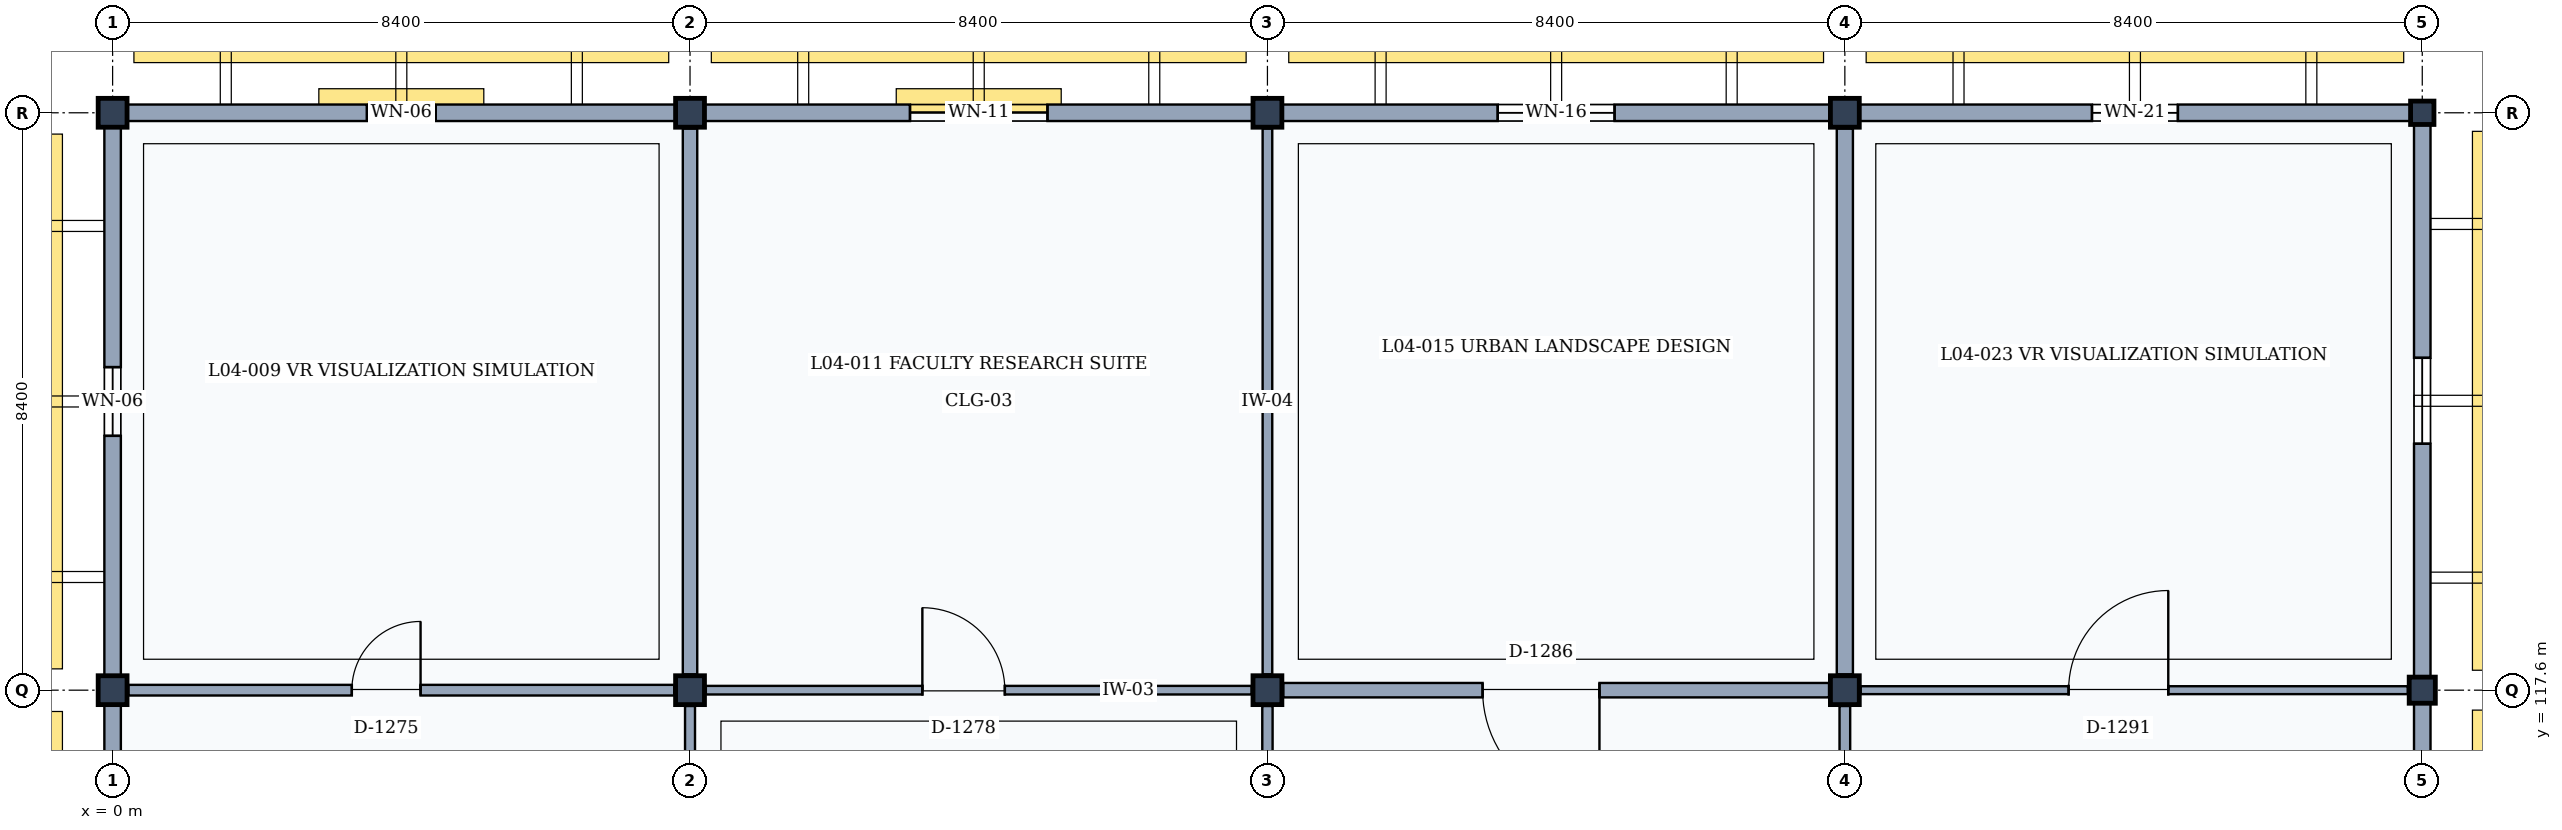
"""IFC4 building model, lengths in metres.
Left out: names, types, materials, properties, quantities, classifications, styles, units other than length and angle.
Written with IfcOpenShell. Run it as: python <this file> out.ifc"""

import sys

from ifc_helpers import new_model, si_unit, direction, frame, frame_2d, origin, origin_2d, place, context, subcontext, project, spatial, rectangle, extrude, element, fill, save


model = new_model("IFC4")
c1 = context("Model", 3, precision=1e-05, world=origin(), true_north=direction((0.0, 1.0)))
c2 = subcontext(c1, "Body", "Model", "MODEL_VIEW")
j1 = project(units=[si_unit("LENGTHUNIT", "METRE"), si_unit("PLANEANGLEUNIT", "RADIAN")], contexts=[c1])
p1 = place(None, origin())
s1 = spatial("IfcSite", under=j1, at=p1, CompositionType="ELEMENT")
p2 = place(p1, origin())
s2 = spatial("IfcBuilding", under=s1, at=p2, CompositionType="ELEMENT")
p3 = place(p2, frame((0.0, 0.0, 18.0)))
s3 = spatial("IfcBuildingStorey", under=s2, at=p3, CompositionType="ELEMENT", Elevation=18.0)
for number, where, z_axis, x_axis in (
    (1, (0.0, 117.6, 0.0), (0.0, 0.0, 1.0), (1.0, 0.0, 0.0)),
    (2, (0.0, 126.0, 0.0), (0.0, 0.0, 1.0), (1.0, 0.0, 0.0)),
    (3, (8.4, 117.6, 0.0), (0.0, 0.0, 1.0), (1.0, 0.0, 0.0)),
    (4, (8.4, 126.0, 0.0), (0.0, 0.0, 1.0), (1.0, 0.0, 0.0)),
    (5, (16.8, 117.6, 0.0), (0.0, 0.0, 1.0), (1.0, 0.0, 0.0)),
    (6, (16.8, 126.0, 0.0), (0.0, 0.0, 1.0), (1.0, 0.0, 0.0)),
    (7, (25.2, 117.6, 0.0), (0.0, 0.0, 1.0), (1.0, 0.0, 0.0)),
    (8, (25.2, 126.0, 0.0), (0.0, 0.0, 1.0), (1.0, 0.0, 0.0)),
):
    element("IfcColumn", number, at=place(p3, frame(where, z_axis=z_axis, x_axis=x_axis)), inside=s3, PredefinedType="COLUMN", context=c2, shape_type="SweptSolid", body=[
        extrude(rectangle(XDim=0.42, YDim=0.42, at=origin_2d()), origin(), (0.0, 0.0, 1.0), 4.2),
    ])
p4 = place(p3, frame((33.6, 117.6, 0.0), z_axis=(0.0, 0.0, 1.0), x_axis=(1.0, 0.0, 0.0)))
e9 = element("IfcColumn", 9, at=p4, inside=s3, PredefinedType="COLUMN", context=c2, shape_type="SweptSolid", body=[
    extrude(rectangle(XDim=0.38, YDim=0.38, at=origin_2d()), origin(), (0.0, 0.0, 1.0), 4.2),
])
p5 = place(p3, frame((33.6, 126.0, 0.0), z_axis=(0.0, 0.0, 1.0), x_axis=(1.0, 0.0, 0.0)))
e10 = element("IfcColumn", 10, at=p5, inside=s3, PredefinedType="COLUMN", context=c2, shape_type="SweptSolid", body=[
    extrude(rectangle(XDim=0.34, YDim=0.34, at=origin_2d()), origin(), (0.0, 0.0, 1.0), 4.2),
])
p6 = place(p3, frame((0.0, 109.41, 0.0), z_axis=(0.0, 0.0, 1.0), x_axis=(0.0, 1.0, 0.0)))
e11 = element("IfcWall", 11, at=p6, inside=s3, PredefinedType="SOLIDWALL", context=c2, shape_type="SweptSolid", body=[
    extrude(rectangle(XDim=7.98, YDim=0.24, at=frame_2d((3.99, 0.0))), origin(), (0.0, 0.0, 1.0), 3.36),
])
p7 = place(p6, frame((2.69, 0.0, 0.9)))
e12 = element("IfcOpeningElement", 12, at=p7, cuts=e11, PredefinedType="OPENING", context=c2, shape_type="SweptSolid", body=[
    extrude(rectangle(XDim=2.6, YDim=2.1, at=frame_2d((1.3, 1.05))), frame((0.0, 0.13, 0.0), z_axis=(0.0, -1.0, 0.0), x_axis=(1.0, 0.0, 0.0)), (0.0, 0.0, 1.0), 0.26),
])
p8 = place(p3, frame((0.21, 126.0, 0.0), z_axis=(0.0, 0.0, 1.0), x_axis=(1.0, 0.0, 0.0)))
e13 = element("IfcWall", 13, at=p8, inside=s3, PredefinedType="SOLIDWALL", context=c2, shape_type="SweptSolid", body=[
    extrude(rectangle(XDim=7.98, YDim=0.24, at=frame_2d((3.99, 0.0))), origin(), (0.0, 0.0, 1.0), 3.36),
])
p9 = place(p8, frame((3.49, 0.0, 0.9)))
e14 = element("IfcOpeningElement", 14, at=p9, cuts=e13, PredefinedType="OPENING", context=c2, shape_type="SweptSolid", body=[
    extrude(rectangle(XDim=1.0, YDim=1.4, at=frame_2d((0.5, 0.7))), frame((0.0, 0.13, 0.0), z_axis=(0.0, -1.0, 0.0), x_axis=(1.0, 0.0, 0.0)), (0.0, 0.0, 1.0), 0.26),
])
p10 = place(p3, frame((0.0, 117.81, 0.0), z_axis=(0.0, 0.0, 1.0), x_axis=(0.0, 1.0, 0.0)))
e15 = element("IfcWall", 15, at=p10, inside=s3, PredefinedType="SOLIDWALL", context=c2, shape_type="SweptSolid", body=[
    extrude(rectangle(XDim=7.98, YDim=0.24, at=frame_2d((3.99, 0.0))), origin(), (0.0, 0.0, 1.0), 3.36),
])
p11 = place(p10, frame((3.49, 0.0, 0.9)))
e16 = element("IfcOpeningElement", 16, at=p11, cuts=e15, PredefinedType="OPENING", context=c2, shape_type="SweptSolid", body=[
    extrude(rectangle(XDim=1.0, YDim=1.4, at=frame_2d((0.5, 0.7))), frame((0.0, 0.13, 0.0), z_axis=(0.0, -1.0, 0.0), x_axis=(1.0, 0.0, 0.0)), (0.0, 0.0, 1.0), 0.26),
])
p12 = place(p3, frame((8.61, 126.0, 0.0), z_axis=(0.0, 0.0, 1.0), x_axis=(1.0, 0.0, 0.0)))
e17 = element("IfcWall", 17, at=p12, inside=s3, PredefinedType="SOLIDWALL", context=c2, shape_type="SweptSolid", body=[
    extrude(rectangle(XDim=7.98, YDim=0.24, at=frame_2d((3.99, 0.0))), origin(), (0.0, 0.0, 1.0), 3.36),
])
p13 = place(p12, frame((2.99, 0.0, 0.9)))
e18 = element("IfcOpeningElement", 18, at=p13, cuts=e17, PredefinedType="OPENING", context=c2, shape_type="SweptSolid", body=[
    extrude(rectangle(XDim=2.0, YDim=1.7, at=frame_2d((1.0, 0.85))), frame((0.0, 0.13, 0.0), z_axis=(0.0, -1.0, 0.0), x_axis=(1.0, 0.0, 0.0)), (0.0, 0.0, 1.0), 0.26),
])
p14 = place(p3, frame((17.01, 126.0, 0.0), z_axis=(0.0, 0.0, 1.0), x_axis=(1.0, 0.0, 0.0)))
e19 = element("IfcWall", 19, at=p14, inside=s3, PredefinedType="SOLIDWALL", context=c2, shape_type="SweptSolid", body=[
    extrude(rectangle(XDim=7.98, YDim=0.24, at=frame_2d((3.99, 0.0))), origin(), (0.0, 0.0, 1.0), 3.36),
])
p15 = place(p14, frame((3.14, 0.0, 0.9)))
e20 = element("IfcOpeningElement", 20, at=p15, cuts=e19, PredefinedType="OPENING", context=c2, shape_type="SweptSolid", body=[
    extrude(rectangle(XDim=1.7, YDim=1.55, at=frame_2d((0.85, 0.775))), frame((0.0, 0.13, 0.0), z_axis=(0.0, -1.0, 0.0), x_axis=(1.0, 0.0, 0.0)), (0.0, 0.0, 1.0), 0.26),
])
p16 = place(p3, frame((33.6, 117.41, 0.0), z_axis=(0.0, 0.0, 1.0), x_axis=(0.0, -1.0, 0.0)))
e21 = element("IfcWall", 21, at=p16, inside=s3, PredefinedType="SOLIDWALL", context=c2, shape_type="SweptSolid", body=[
    extrude(rectangle(XDim=8.02, YDim=0.24, at=frame_2d((4.01, 0.0))), origin(), (0.0, 0.0, 1.0), 3.36),
])
p17 = place(p16, frame((3.06, 0.0, 0.9)))
e22 = element("IfcOpeningElement", 22, at=p17, cuts=e21, PredefinedType="OPENING", context=c2, shape_type="SweptSolid", body=[
    extrude(rectangle(XDim=1.9, YDim=2.05, at=frame_2d((0.95, 1.025))), frame((0.0, 0.13, 0.0), z_axis=(0.0, -1.0, 0.0), x_axis=(1.0, 0.0, 0.0)), (0.0, 0.0, 1.0), 0.26),
])
p18 = place(p3, frame((25.41, 126.0, 0.0), z_axis=(0.0, 0.0, 1.0), x_axis=(1.0, 0.0, 0.0)))
e23 = element("IfcWall", 23, at=p18, inside=s3, PredefinedType="SOLIDWALL", context=c2, shape_type="SweptSolid", body=[
    extrude(rectangle(XDim=8.02, YDim=0.24, at=frame_2d((4.01, 0.0))), origin(), (0.0, 0.0, 1.0), 3.36),
])
p19 = place(p18, frame((3.385, 0.0, 0.9)))
e24 = element("IfcOpeningElement", 24, at=p19, cuts=e23, PredefinedType="OPENING", context=c2, shape_type="SweptSolid", body=[
    extrude(rectangle(XDim=1.25, YDim=1.7, at=frame_2d((0.625, 0.85))), frame((0.0, 0.13, 0.0), z_axis=(0.0, -1.0, 0.0), x_axis=(1.0, 0.0, 0.0)), (0.0, 0.0, 1.0), 0.26),
])
p20 = place(p3, frame((33.6, 125.83, 0.0), z_axis=(0.0, 0.0, 1.0), x_axis=(0.0, -1.0, 0.0)))
e25 = element("IfcWall", 25, at=p20, inside=s3, PredefinedType="SOLIDWALL", context=c2, shape_type="SweptSolid", body=[
    extrude(rectangle(XDim=8.04, YDim=0.24, at=frame_2d((4.02, 0.0))), origin(), (0.0, 0.0, 1.0), 3.36),
])
p21 = place(p20, frame((3.395, 0.0, 0.9)))
e26 = element("IfcOpeningElement", 26, at=p21, cuts=e25, PredefinedType="OPENING", context=c2, shape_type="SweptSolid", body=[
    extrude(rectangle(XDim=1.25, YDim=1.7, at=frame_2d((0.625, 0.85))), frame((0.0, 0.13, 0.0), z_axis=(0.0, -1.0, 0.0), x_axis=(1.0, 0.0, 0.0)), (0.0, 0.0, 1.0), 0.26),
])
p22 = place(p3, frame((8.4, 109.43, 0.0), z_axis=(0.0, 0.0, 1.0), x_axis=(0.0, 1.0, 0.0)))
e27 = element("IfcWall", 27, at=p22, inside=s3, PredefinedType="PARTITIONING", context=c2, shape_type="SweptSolid", body=[
    extrude(rectangle(XDim=7.94, YDim=0.145, at=frame_2d((3.97, 0.0))), origin(), (0.0, 0.0, 1.0), 3.32),
])
p23 = place(p3, frame((0.23, 117.6, 0.0), z_axis=(0.0, 0.0, 1.0), x_axis=(1.0, 0.0, 0.0)))
e28 = element("IfcWall", 28, at=p23, inside=s3, PredefinedType="PARTITIONING", context=c2, shape_type="SweptSolid", body=[
    extrude(rectangle(XDim=7.94, YDim=0.155, at=frame_2d((3.97, 0.0))), origin(), (0.0, 0.0, 1.0), 3.32),
])
p24 = place(p23, frame((3.25, 0.0, 0.0)))
e29 = element("IfcOpeningElement", 29, at=p24, cuts=e28, PredefinedType="OPENING", context=c2, shape_type="SweptSolid", body=[
    extrude(rectangle(XDim=1.0, YDim=2.15, at=frame_2d((0.5, 1.075))), frame((0.0, 0.087, 0.0), z_axis=(0.0, -1.0, 0.0), x_axis=(1.0, 0.0, 0.0)), (0.0, 0.0, 1.0), 0.175),
])
p25 = place(p3, frame((8.4, 117.83, 0.0), z_axis=(0.0, 0.0, 1.0), x_axis=(0.0, 1.0, 0.0)))
e30 = element("IfcWall", 30, at=p25, inside=s3, PredefinedType="PARTITIONING", context=c2, shape_type="SweptSolid", body=[
    extrude(rectangle(XDim=7.94, YDim=0.21, at=frame_2d((3.97, 0.0))), origin(), (0.0, 0.0, 1.0), 3.32),
])
p26 = place(p3, frame((16.8, 109.43, 0.0), z_axis=(0.0, 0.0, 1.0), x_axis=(0.0, 1.0, 0.0)))
e31 = element("IfcWall", 31, at=p26, inside=s3, PredefinedType="PARTITIONING", context=c2, shape_type="SweptSolid", body=[
    extrude(rectangle(XDim=7.94, YDim=0.15, at=frame_2d((3.97, 0.0))), origin(), (0.0, 0.0, 1.0), 3.32),
])
p27 = place(p26, frame((2.85, 0.0, 0.0)))
e32 = element("IfcOpeningElement", 32, at=p27, cuts=e31, PredefinedType="OPENING", context=c2, shape_type="SweptSolid", body=[
    extrude(rectangle(XDim=1.8, YDim=2.3, at=frame_2d((0.9, 1.15))), frame((0.0, 0.085, 0.0), z_axis=(0.0, -1.0, 0.0), x_axis=(1.0, 0.0, 0.0)), (0.0, 0.0, 1.0), 0.17),
])
p28 = place(p3, frame((8.63, 117.6, 0.0), z_axis=(0.0, 0.0, 1.0), x_axis=(1.0, 0.0, 0.0)))
e33 = element("IfcWall", 33, at=p28, inside=s3, PredefinedType="PARTITIONING", context=c2, shape_type="SweptSolid", body=[
    extrude(rectangle(XDim=7.94, YDim=0.125, at=frame_2d((3.97, 0.0))), origin(), (0.0, 0.0, 1.0), 3.32),
])
p29 = place(p28, frame((3.15, 0.0, 0.0)))
e34 = element("IfcOpeningElement", 34, at=p29, cuts=e33, PredefinedType="OPENING", context=c2, shape_type="SweptSolid", body=[
    extrude(rectangle(XDim=1.2, YDim=2.2, at=frame_2d((0.6, 1.1))), frame((0.0, 0.073, 0.0), z_axis=(0.0, -1.0, 0.0), x_axis=(1.0, 0.0, 0.0)), (0.0, 0.0, 1.0), 0.145),
])
p30 = place(p3, frame((16.8, 117.83, 0.0), z_axis=(0.0, 0.0, 1.0), x_axis=(0.0, 1.0, 0.0)))
e35 = element("IfcWall", 35, at=p30, inside=s3, PredefinedType="PARTITIONING", context=c2, shape_type="SweptSolid", body=[
    extrude(rectangle(XDim=7.94, YDim=0.14, at=frame_2d((3.97, 0.0))), origin(), (0.0, 0.0, 1.0), 3.32),
])
p31 = place(p3, frame((25.2, 109.43, 0.0), z_axis=(0.0, 0.0, 1.0), x_axis=(0.0, 1.0, 0.0)))
e36 = element("IfcWall", 36, at=p31, inside=s3, PredefinedType="PARTITIONING", context=c2, shape_type="SweptSolid", body=[
    extrude(rectangle(XDim=7.94, YDim=0.155, at=frame_2d((3.97, 0.0))), origin(), (0.0, 0.0, 1.0), 3.32),
])
p32 = place(p3, frame((17.03, 117.6, 0.0), z_axis=(0.0, 0.0, 1.0), x_axis=(1.0, 0.0, 0.0)))
e37 = element("IfcWall", 37, at=p32, inside=s3, PredefinedType="PARTITIONING", context=c2, shape_type="SweptSolid", body=[
    extrude(rectangle(XDim=7.94, YDim=0.21, at=frame_2d((3.97, 0.0))), origin(), (0.0, 0.0, 1.0), 3.32),
])
p33 = place(p32, frame((2.9, 0.0, 0.0)))
e38 = element("IfcOpeningElement", 38, at=p33, cuts=e37, PredefinedType="OPENING", context=c2, shape_type="SweptSolid", body=[
    extrude(rectangle(XDim=1.7, YDim=2.3, at=frame_2d((0.85, 1.15))), frame((0.0, 0.115, 0.0), z_axis=(0.0, -1.0, 0.0), x_axis=(1.0, 0.0, 0.0)), (0.0, 0.0, 1.0), 0.23),
])
p34 = place(p3, frame((25.2, 117.83, 0.0), z_axis=(0.0, 0.0, 1.0), x_axis=(0.0, 1.0, 0.0)))
e39 = element("IfcWall", 39, at=p34, inside=s3, PredefinedType="PARTITIONING", context=c2, shape_type="SweptSolid", body=[
    extrude(rectangle(XDim=7.94, YDim=0.235, at=frame_2d((3.97, 0.0))), origin(), (0.0, 0.0, 1.0), 3.32),
])
p35 = place(p3, frame((25.43, 117.6, 0.0), z_axis=(0.0, 0.0, 1.0), x_axis=(1.0, 0.0, 0.0)))
e40 = element("IfcWall", 40, at=p35, inside=s3, PredefinedType="PARTITIONING", context=c2, shape_type="SweptSolid", body=[
    extrude(rectangle(XDim=7.96, YDim=0.115, at=frame_2d((3.98, 0.0))), origin(), (0.0, 0.0, 1.0), 3.32),
])
p36 = place(p35, frame((3.025, 0.0, 0.0)))
e41 = element("IfcOpeningElement", 41, at=p36, cuts=e40, PredefinedType="OPENING", context=c2, shape_type="SweptSolid", body=[
    extrude(rectangle(XDim=1.45, YDim=2.35, at=frame_2d((0.725, 1.175))), frame((0.0, 0.067, 0.0), z_axis=(0.0, -1.0, 0.0), x_axis=(1.0, 0.0, 0.0)), (0.0, 0.0, 1.0), 0.135),
])
p37 = place(p9, origin())
e42 = element("IfcWindow", 42, at=p37, inside=s3, PartitioningType="SINGLE_PANEL", PredefinedType="WINDOW", context=c2, shape_type="SweptSolid", body=[
    extrude(rectangle(XDim=1.0, YDim=1.4, at=frame_2d((0.5, 0.7))), frame((0.0, 0.03, 0.0), z_axis=(0.0, -1.0, 0.0), x_axis=(1.0, 0.0, 0.0)), (0.0, 0.0, 1.0), 0.06),
])
fill(e14, e42)
p38 = place(p11, origin())
e43 = element("IfcWindow", 43, at=p38, inside=s3, PartitioningType="SINGLE_PANEL", PredefinedType="WINDOW", context=c2, shape_type="SweptSolid", body=[
    extrude(rectangle(XDim=1.0, YDim=1.4, at=frame_2d((0.5, 0.7))), frame((0.0, 0.03, 0.0), z_axis=(0.0, -1.0, 0.0), x_axis=(1.0, 0.0, 0.0)), (0.0, 0.0, 1.0), 0.06),
])
fill(e16, e43)
p39 = place(p13, origin())
e44 = element("IfcWindow", 44, at=p39, inside=s3, PartitioningType="SINGLE_PANEL", PredefinedType="WINDOW", context=c2, shape_type="SweptSolid", body=[
    extrude(rectangle(XDim=2.0, YDim=1.7, at=frame_2d((1.0, 0.85))), frame((0.0, 0.03, 0.0), z_axis=(0.0, -1.0, 0.0), x_axis=(1.0, 0.0, 0.0)), (0.0, 0.0, 1.0), 0.06),
])
fill(e18, e44)
p40 = place(p15, origin())
e45 = element("IfcWindow", 45, at=p40, inside=s3, PartitioningType="SINGLE_PANEL", PredefinedType="WINDOW", context=c2, shape_type="SweptSolid", body=[
    extrude(rectangle(XDim=1.7, YDim=1.55, at=frame_2d((0.85, 0.775))), frame((0.0, 0.03, 0.0), z_axis=(0.0, -1.0, 0.0), x_axis=(1.0, 0.0, 0.0)), (0.0, 0.0, 1.0), 0.06),
])
fill(e20, e45)
p41 = place(p19, origin())
e46 = element("IfcWindow", 46, at=p41, inside=s3, PartitioningType="SINGLE_PANEL", PredefinedType="WINDOW", context=c2, shape_type="SweptSolid", body=[
    extrude(rectangle(XDim=1.25, YDim=1.7, at=frame_2d((0.625, 0.85))), frame((0.0, 0.03, 0.0), z_axis=(0.0, -1.0, 0.0), x_axis=(1.0, 0.0, 0.0)), (0.0, 0.0, 1.0), 0.06),
])
fill(e24, e46)
p42 = place(p21, origin())
e47 = element("IfcWindow", 47, at=p42, inside=s3, PartitioningType="SINGLE_PANEL", PredefinedType="WINDOW", context=c2, shape_type="SweptSolid", body=[
    extrude(rectangle(XDim=1.25, YDim=1.7, at=frame_2d((0.625, 0.85))), frame((0.0, 0.03, 0.0), z_axis=(0.0, -1.0, 0.0), x_axis=(1.0, 0.0, 0.0)), (0.0, 0.0, 1.0), 0.06),
])
fill(e26, e47)
p43 = place(p24, origin())
e48 = element("IfcDoor", 48, at=p43, inside=s3, OperationType="SINGLE_SWING_RIGHT", PredefinedType="DOOR", context=c2, shape_type="SweptSolid", body=[
    extrude(rectangle(XDim=1.0, YDim=2.15, at=frame_2d((0.5, 1.075))), frame((0.0, 0.025, 0.0), z_axis=(0.0, -1.0, 0.0), x_axis=(1.0, 0.0, 0.0)), (0.0, 0.0, 1.0), 0.05),
])
fill(e29, e48)
p44 = place(p29, origin())
e49 = element("IfcDoor", 49, at=p44, inside=s3, OperationType="SINGLE_SWING_LEFT", PredefinedType="DOOR", context=c2, shape_type="SweptSolid", body=[
    extrude(rectangle(XDim=1.2, YDim=2.2, at=frame_2d((0.6, 1.1))), frame((0.0, 0.025, 0.0), z_axis=(0.0, -1.0, 0.0), x_axis=(1.0, 0.0, 0.0)), (0.0, 0.0, 1.0), 0.05),
])
fill(e34, e49)
p45 = place(p33, frame((1.7, 0.0, 0.0), z_axis=(0.0, 0.0, 1.0), x_axis=(-1.0, 0.0, 0.0)))
e50 = element("IfcDoor", 50, at=p45, inside=s3, OperationType="SINGLE_SWING_LEFT", PredefinedType="DOOR", context=c2, shape_type="SweptSolid", body=[
    extrude(rectangle(XDim=1.7, YDim=2.3, at=frame_2d((0.85, 1.15))), frame((0.0, 0.025, 0.0), z_axis=(0.0, -1.0, 0.0), x_axis=(1.0, 0.0, 0.0)), (0.0, 0.0, 1.0), 0.05),
])
fill(e38, e50)
p46 = place(p36, origin())
e51 = element("IfcDoor", 51, at=p46, inside=s3, OperationType="SINGLE_SWING_RIGHT", PredefinedType="DOOR", context=c2, shape_type="SweptSolid", body=[
    extrude(rectangle(XDim=1.45, YDim=2.35, at=frame_2d((0.725, 1.175))), frame((0.0, 0.025, 0.0), z_axis=(0.0, -1.0, 0.0), x_axis=(1.0, 0.0, 0.0)), (0.0, 0.0, 1.0), 0.05),
])
fill(e41, e51)
save(model, sys.argv[1])
